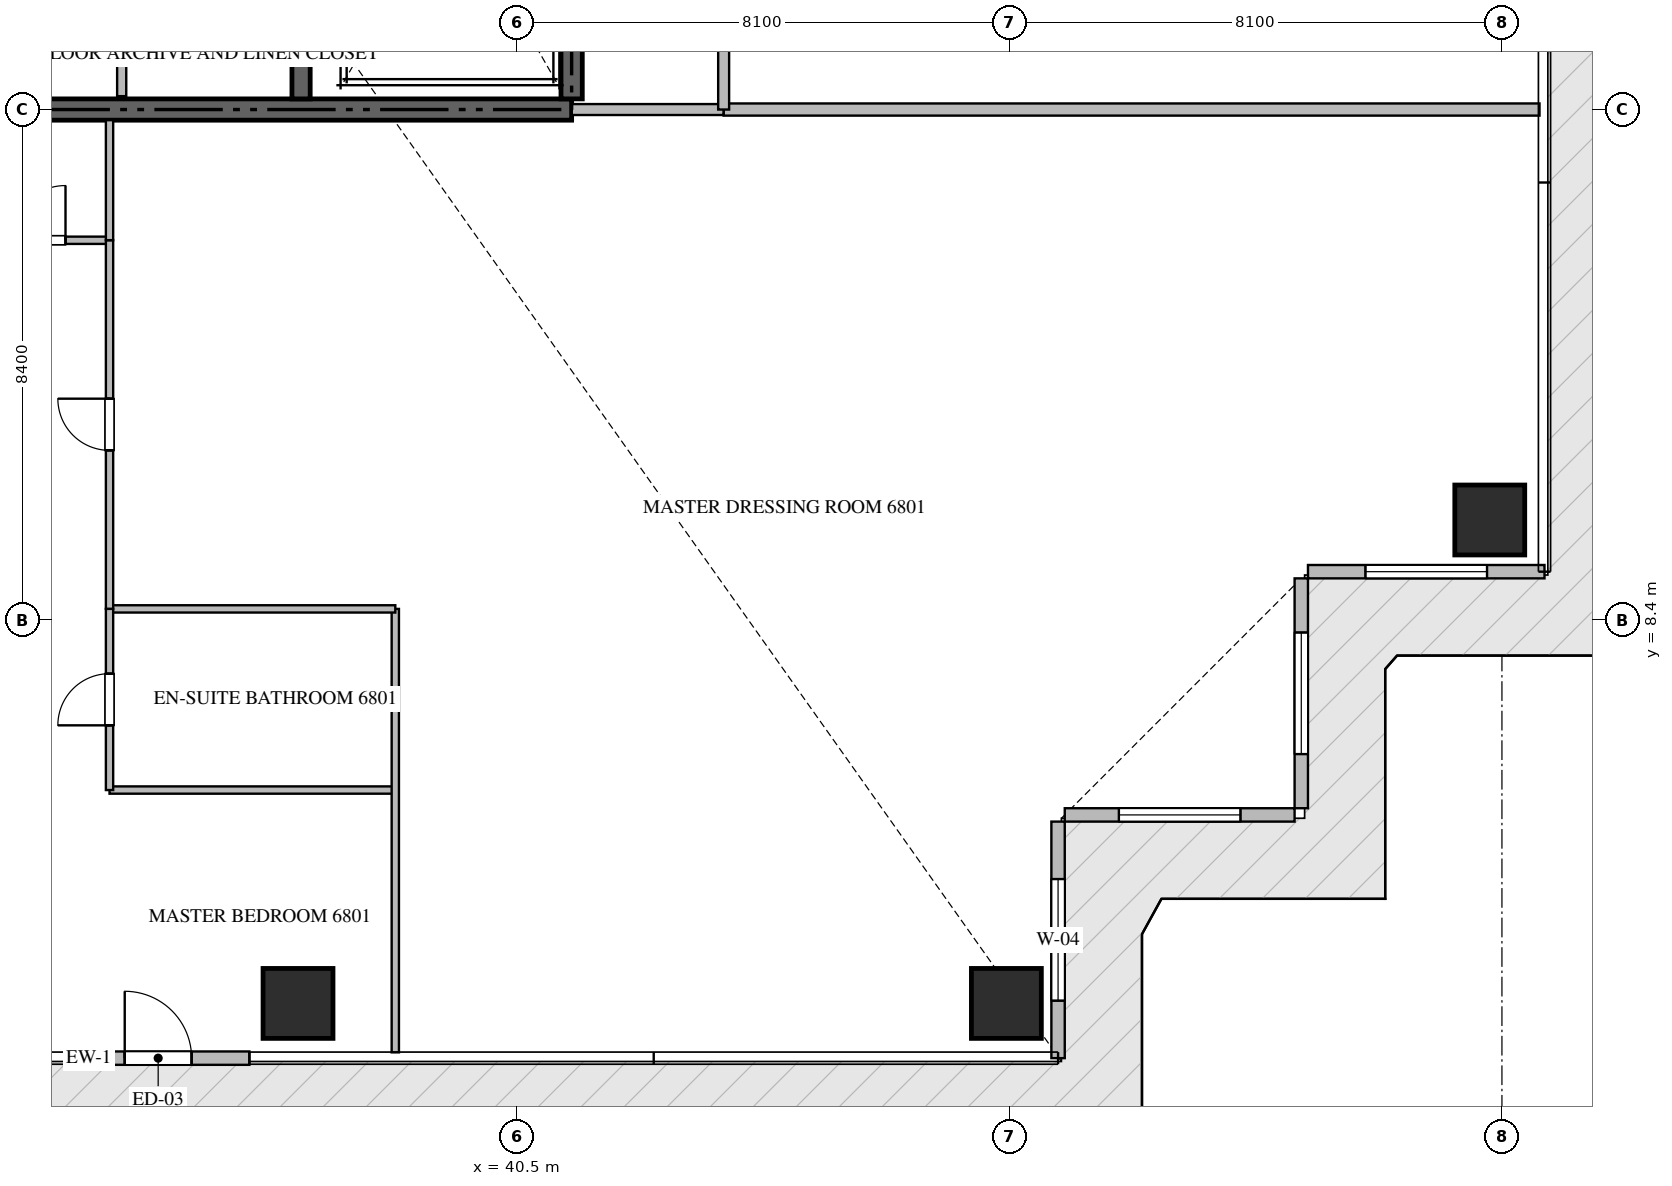
"""IFC4 building model, lengths in metres.
Left out: names, types, materials, properties, quantities, classifications, styles, units other than length and angle.
Written with IfcOpenShell. Run it as: python <this file> out.ifc"""

import sys

from ifc_helpers import new_model, si_unit, direction, frame, frame_2d, origin, origin_2d, place, context, subcontext, project, spatial, rectangle, extrude, source, transform, mapped, element, fill, save


model = new_model("IFC4")
c1 = context("Model", 3, precision=1e-05, world=origin(), true_north=direction((0.0, 1.0)))
c2 = subcontext(c1, "Body", "Model", "MODEL_VIEW")
j1 = project(units=[si_unit("LENGTHUNIT", "METRE"), si_unit("PLANEANGLEUNIT", "RADIAN")], contexts=[c1])
p1 = place(None, origin())
s1 = spatial("IfcSite", under=j1, at=p1, CompositionType="ELEMENT")
p2 = place(p1, origin())
s2 = spatial("IfcBuilding", under=s1, at=p2, CompositionType="ELEMENT")
p3 = place(p2, frame((0.0, 0.0, 272.05)))
s3 = spatial("IfcBuildingStorey", under=s2, at=p3, CompositionType="ELEMENT", Elevation=272.05)
p4 = place(p3, frame((23.4, 16.8, -0.26), z_axis=(0.0, 0.0, 1.0), x_axis=(1.0, 0.0, 0.0)))
e1 = element("IfcWall", 1, at=p4, inside=s3, PredefinedType="SHEAR", context=c2, shape_type="SweptSolid", body=[
    extrude(rectangle(XDim=18.0, YDim=0.35, at=frame_2d((9.0, 0.0))), origin(), (0.0, 0.0, 1.0), 3.848),
])
p5 = place(p3, frame((41.4, 16.975, -0.26), z_axis=(0.0, 0.0, 1.0), x_axis=(0.0, 1.0, 0.0)))
e2 = element("IfcWall", 2, at=p5, inside=s3, PredefinedType="SHEAR", context=c2, shape_type="SweptSolid", body=[
    extrude(rectangle(XDim=8.375, YDim=0.35, at=frame_2d((4.188, 0.0))), origin(), (0.0, 0.0, 1.0), 3.848),
])
p6 = place(p3, frame((36.95, 16.975, -0.26), z_axis=(0.0, 0.0, 1.0), x_axis=(0.0, 1.0, 0.0)))
e3 = element("IfcWall", 3, at=p6, inside=s3, PredefinedType="SHEAR", context=c2, shape_type="SweptSolid", body=[
    extrude(rectangle(XDim=8.375, YDim=0.3, at=frame_2d((4.188, 0.0))), origin(), (0.0, 0.0, 1.0), 3.848),
])
m1 = source(origin(), c2, "Body", "SweptSolid", [
    extrude(rectangle(XDim=1.15, YDim=1.15, at=origin_2d()), origin(), (0.0, 0.0, 1.0), 3.85),
])
for number, where, z_axis, x_axis in (
    (4, (36.9, 2.1, -0.26), (0.0, 0.0, 1.0), (1.0, 0.0, 0.0)),
    (5, (48.55, 2.1, -0.26), (0.0, 0.0, 1.0), (1.0, 0.0, 0.0)),
    (6, (56.5, 10.05, -0.26), (0.0, 0.0, 1.0), (1.0, 0.0, 0.0)),
):
    element("IfcColumn", number, at=place(p3, frame(where, z_axis=z_axis, x_axis=x_axis)), inside=s3, PredefinedType="COLUMN", context=c2, shape_type="MappedRepresentation", body=[
        mapped(m1, transform((0.0, 0.0, 0.0), scale=1.0)),
    ])
p7 = place(p3, frame((33.1, 1.2, 0.0), z_axis=(0.0, 0.0, 1.0), x_axis=(1.0, 0.0, 0.0)))
e7 = element("IfcWall", 7, at=p7, inside=s3, PredefinedType="ELEMENTEDWALL", context=c2, shape_type="SweptSolid", body=[
    extrude(rectangle(XDim=3.0, YDim=0.22, at=frame_2d((1.5, 0.0))), origin(), (0.0, 0.0, 1.0), 3.575),
])
p8 = place(p7, frame((0.95, 0.0, 0.0)))
e8 = element("IfcOpeningElement", 8, at=p8, cuts=e7, PredefinedType="OPENING", context=c2, shape_type="SweptSolid", body=[
    extrude(rectangle(XDim=1.1, YDim=2.2, at=frame_2d((0.55, 1.1))), frame((0.0, 0.12, 0.0), z_axis=(0.0, -1.0, 0.0), x_axis=(1.0, 0.0, 0.0)), (0.0, 0.0, 1.0), 0.24),
])
p9 = place(p3, frame((49.4, 1.2, 0.0), z_axis=(0.0, 0.0, 1.0), x_axis=(0.0, 1.0, 0.0)))
e9 = element("IfcWall", 9, at=p9, inside=s3, PredefinedType="ELEMENTEDWALL", context=c2, shape_type="SweptSolid", body=[
    extrude(rectangle(XDim=3.89, YDim=0.22, at=frame_2d((1.945, 0.0))), origin(), (0.0, 0.0, 1.0), 3.575),
])
p10 = place(p9, frame((0.945, 0.0, 0.65)))
e10 = element("IfcOpeningElement", 10, at=p10, cuts=e9, PredefinedType="OPENING", context=c2, shape_type="SweptSolid", body=[
    extrude(rectangle(XDim=2.0, YDim=2.2, at=frame_2d((1.0, 1.1))), frame((0.0, 0.12, 0.0), z_axis=(0.0, -1.0, 0.0), x_axis=(1.0, 0.0, 0.0)), (0.0, 0.0, 1.0), 0.24),
])
p11 = place(p3, frame((49.51, 5.2, 0.0), z_axis=(0.0, 0.0, 1.0), x_axis=(1.0, 0.0, 0.0)))
e11 = element("IfcWall", 11, at=p11, inside=s3, PredefinedType="ELEMENTEDWALL", context=c2, shape_type="SweptSolid", body=[
    extrude(rectangle(XDim=3.78, YDim=0.22, at=frame_2d((1.89, 0.0))), origin(), (0.0, 0.0, 1.0), 3.575),
])
p12 = place(p11, frame((0.89, 0.0, 0.65)))
e12 = element("IfcOpeningElement", 12, at=p12, cuts=e11, PredefinedType="OPENING", context=c2, shape_type="SweptSolid", body=[
    extrude(rectangle(XDim=2.0, YDim=2.2, at=frame_2d((1.0, 1.1))), frame((0.0, 0.12, 0.0), z_axis=(0.0, -1.0, 0.0), x_axis=(1.0, 0.0, 0.0)), (0.0, 0.0, 1.0), 0.24),
])
p13 = place(p3, frame((53.4, 5.31, 0.0), z_axis=(0.0, 0.0, 1.0), x_axis=(0.0, 1.0, 0.0)))
e13 = element("IfcWall", 13, at=p13, inside=s3, PredefinedType="ELEMENTEDWALL", context=c2, shape_type="SweptSolid", body=[
    extrude(rectangle(XDim=3.78, YDim=0.22, at=frame_2d((1.89, 0.0))), origin(), (0.0, 0.0, 1.0), 3.575),
])
p14 = place(p13, frame((0.89, 0.0, 0.65)))
e14 = element("IfcOpeningElement", 14, at=p14, cuts=e13, PredefinedType="OPENING", context=c2, shape_type="SweptSolid", body=[
    extrude(rectangle(XDim=2.0, YDim=2.2, at=frame_2d((1.0, 1.1))), frame((0.0, 0.12, 0.0), z_axis=(0.0, -1.0, 0.0), x_axis=(1.0, 0.0, 0.0)), (0.0, 0.0, 1.0), 0.24),
])
p15 = place(p3, frame((53.51, 9.2, 0.0), z_axis=(0.0, 0.0, 1.0), x_axis=(1.0, 0.0, 0.0)))
e15 = element("IfcWall", 15, at=p15, inside=s3, PredefinedType="ELEMENTEDWALL", context=c2, shape_type="SweptSolid", body=[
    extrude(rectangle(XDim=3.89, YDim=0.22, at=frame_2d((1.945, 0.0))), origin(), (0.0, 0.0, 1.0), 3.575),
])
p16 = place(p15, frame((0.945, 0.0, 0.65)))
e16 = element("IfcOpeningElement", 16, at=p16, cuts=e15, PredefinedType="OPENING", context=c2, shape_type="SweptSolid", body=[
    extrude(rectangle(XDim=2.0, YDim=2.2, at=frame_2d((1.0, 1.1))), frame((0.0, 0.12, 0.0), z_axis=(0.0, -1.0, 0.0), x_axis=(1.0, 0.0, 0.0)), (0.0, 0.0, 1.0), 0.24),
])
p17 = place(p3, frame((34.0, 17.02, 0.0), z_axis=(0.0, 0.0, 1.0), x_axis=(0.0, 1.0, 0.0)))
e17 = element("IfcWall", 17, at=p17, inside=s3, PredefinedType="PARTITIONING", context=c2, shape_type="SweptSolid", body=[
    extrude(rectangle(XDim=2.73, YDim=0.15, at=frame_2d((1.365, 0.0))), origin(), (0.0, 0.0, 1.0), 3.59),
])
p18 = place(p3, frame((43.9, 16.8, 0.0), z_axis=(0.0, 0.0, 1.0), x_axis=(1.0, 0.0, 0.0)))
e18 = element("IfcWall", 18, at=p18, inside=s3, PredefinedType="PARTITIONING", context=c2, shape_type="SweptSolid", body=[
    extrude(rectangle(XDim=13.418, YDim=0.2, at=frame_2d((6.709, 0.0))), origin(), (0.0, 0.0, 1.0), 3.59),
])
p19 = place(p3, frame((41.402, 16.8, 0.0), z_axis=(0.0, 0.0, 1.0), x_axis=(1.0, 0.0, 0.0)))
e19 = element("IfcWall", 19, at=p19, inside=s3, PredefinedType="PARTITIONING", context=c2, shape_type="SweptSolid", body=[
    extrude(rectangle(XDim=2.496, YDim=0.18, at=frame_2d((1.248, 0.0))), origin(), (0.0, 0.0, 1.0), 3.59),
])
p20 = place(p3, frame((43.9, 16.8, 0.0), z_axis=(0.0, 0.0, 1.0), x_axis=(0.0, 1.0, 0.0)))
e20 = element("IfcWall", 20, at=p20, inside=s3, PredefinedType="PARTITIONING", context=c2, shape_type="SweptSolid", body=[
    extrude(rectangle(XDim=16.8, YDim=0.18, at=frame_2d((8.4, 0.0))), origin(), (0.0, 0.0, 1.0), 3.59),
])
p21 = place(p20, frame((2.575, 0.0, 0.0)))
e21 = element("IfcOpeningElement", 21, at=p21, cuts=e20, PredefinedType="OPENING", context=c2, shape_type="SweptSolid", body=[
    extrude(rectangle(XDim=1.0, YDim=2.15, at=frame_2d((0.5, 1.075))), frame((0.0, 0.1, 0.0), z_axis=(0.0, -1.0, 0.0), x_axis=(1.0, 0.0, 0.0)), (0.0, 0.0, 1.0), 0.2),
])
p22 = place(p20, frame((10.997, 0.0, 0.0)))
e22 = element("IfcOpeningElement", 22, at=p22, cuts=e20, PredefinedType="OPENING", context=c2, shape_type="SweptSolid", body=[
    extrude(rectangle(XDim=1.0, YDim=2.15, at=frame_2d((0.5, 1.075))), frame((0.0, 0.1, 0.0), z_axis=(0.0, -1.0, 0.0), x_axis=(1.0, 0.0, 0.0)), (0.0, 0.0, 1.0), 0.2),
])
p23 = place(p3, frame((31.452, 14.65, 0.0), z_axis=(0.0, 0.0, 1.0), x_axis=(1.0, 0.0, 0.0)))
e23 = element("IfcWall", 23, at=p23, inside=s3, PredefinedType="PARTITIONING", context=c2, shape_type="SweptSolid", body=[
    extrude(rectangle(XDim=2.348, YDim=0.12, at=frame_2d((1.174, 0.0))), origin(), (0.0, 0.0, 1.0), 3.59),
])
p24 = place(p23, frame((0.724, 0.0, 0.0)))
e24 = element("IfcOpeningElement", 24, at=p24, cuts=e23, PredefinedType="OPENING", context=c2, shape_type="SweptSolid", body=[
    extrude(rectangle(XDim=0.9, YDim=2.1, at=frame_2d((0.45, 1.05))), frame((0.0, 0.07, 0.0), z_axis=(0.0, -1.0, 0.0), x_axis=(1.0, 0.0, 0.0)), (0.0, 0.0, 1.0), 0.14),
])
p25 = place(p3, frame((33.8, 5.609, 0.0), z_axis=(0.0, 0.0, 1.0), x_axis=(1.0, 0.0, 0.0)))
e25 = element("IfcWall", 25, at=p25, inside=s3, PredefinedType="PARTITIONING", context=c2, shape_type="SweptSolid", body=[
    extrude(rectangle(XDim=4.7, YDim=0.12, at=frame_2d((2.35, 0.0))), origin(), (0.0, 0.0, 1.0), 3.59),
])
p26 = place(p3, frame((38.5, 1.295, 0.0), z_axis=(0.0, 0.0, 1.0), x_axis=(0.0, 1.0, 0.0)))
e26 = element("IfcWall", 26, at=p26, inside=s3, PredefinedType="PARTITIONING", context=c2, shape_type="SweptSolid", body=[
    extrude(rectangle(XDim=7.293, YDim=0.12, at=frame_2d((3.646, 0.0))), origin(), (0.0, 0.0, 1.0), 3.59),
])
p27 = place(p3, frame((33.8, 8.588, 0.0), z_axis=(0.0, 0.0, 1.0), x_axis=(1.0, 0.0, 0.0)))
e27 = element("IfcWall", 27, at=p27, inside=s3, PredefinedType="PARTITIONING", context=c2, shape_type="SweptSolid", body=[
    extrude(rectangle(XDim=4.7, YDim=0.12, at=frame_2d((2.35, 0.0))), origin(), (0.0, 0.0, 1.0), 3.59),
])
p28 = place(p3, frame((33.8, 5.609, 0.0), z_axis=(0.0, 0.0, 1.0), x_axis=(0.0, 1.0, 0.0)))
e28 = element("IfcWall", 28, at=p28, inside=s3, PredefinedType="PARTITIONING", context=c2, shape_type="SweptSolid", body=[
    extrude(rectangle(XDim=2.979, YDim=0.12, at=frame_2d((1.49, 0.0))), origin(), (0.0, 0.0, 1.0), 3.59),
])
p29 = place(p28, frame((1.064, 0.0, 0.0)))
e29 = element("IfcOpeningElement", 29, at=p29, cuts=e28, PredefinedType="OPENING", context=c2, shape_type="SweptSolid", body=[
    extrude(rectangle(XDim=0.85, YDim=2.1, at=frame_2d((0.425, 1.05))), frame((0.0, 0.07, 0.0), z_axis=(0.0, -1.0, 0.0), x_axis=(1.0, 0.0, 0.0)), (0.0, 0.0, 1.0), 0.14),
])
p30 = place(p3, frame((33.8, 8.59, 0.0), z_axis=(0.0, 0.0, 1.0), x_axis=(0.0, 1.0, 0.0)))
e30 = element("IfcWall", 30, at=p30, inside=s3, PredefinedType="PARTITIONING", context=c2, shape_type="SweptSolid", body=[
    extrude(rectangle(XDim=6.06, YDim=0.12, at=frame_2d((3.03, 0.0))), origin(), (0.0, 0.0, 1.0), 3.59),
])
p31 = place(p30, frame((2.605, 0.0, 0.0)))
e31 = element("IfcOpeningElement", 31, at=p31, cuts=e30, PredefinedType="OPENING", context=c2, shape_type="SweptSolid", body=[
    extrude(rectangle(XDim=0.85, YDim=2.1, at=frame_2d((0.425, 1.05))), frame((0.0, 0.07, 0.0), z_axis=(0.0, -1.0, 0.0), x_axis=(1.0, 0.0, 0.0)), (0.0, 0.0, 1.0), 0.14),
])
p32 = place(p3, frame((33.8, 14.652, 0.0), z_axis=(0.0, 0.0, 1.0), x_axis=(0.0, 1.0, 0.0)))
e32 = element("IfcWall", 32, at=p32, inside=s3, PredefinedType="PARTITIONING", context=c2, shape_type="SweptSolid", body=[
    extrude(rectangle(XDim=1.973, YDim=0.12, at=frame_2d((0.986, 0.0))), origin(), (0.0, 0.0, 1.0), 3.59),
])
m2 = source(origin(), c2, "Body", "SweptSolid", [
    extrude(rectangle(XDim=1.1, YDim=2.2, at=frame_2d((0.55, 1.1))), frame((0.0, 0.025, 0.0), z_axis=(0.0, -1.0, 0.0), x_axis=(1.0, 0.0, 0.0)), (0.0, 0.0, 1.0), 0.05),
])
p33 = place(p8, origin())
e33 = element("IfcDoor", 33, at=p33, inside=s3, OperationType="SINGLE_SWING_LEFT", PredefinedType="DOOR", context=c2, shape_type="MappedRepresentation", body=[
    mapped(m2, transform((0.0, 0.0, 0.0), scale=1.0)),
])
fill(e8, e33)
m3 = source(origin(), c2, "Body", "SweptSolid", [
    extrude(rectangle(XDim=2.0, YDim=2.2, at=frame_2d((1.0, 1.1))), frame((0.0, 0.03, 0.0), z_axis=(0.0, -1.0, 0.0), x_axis=(1.0, 0.0, 0.0)), (0.0, 0.0, 1.0), 0.06),
])
p34 = place(p10, origin())
e34 = element("IfcWindow", 34, at=p34, inside=s3, PartitioningType="SINGLE_PANEL", PredefinedType="WINDOW", context=c2, shape_type="MappedRepresentation", body=[
    mapped(m3, transform((0.0, 0.0, 0.0), scale=1.0)),
])
fill(e10, e34)
p35 = place(p12, origin())
e35 = element("IfcWindow", 35, at=p35, inside=s3, PartitioningType="SINGLE_PANEL", PredefinedType="WINDOW", context=c2, shape_type="MappedRepresentation", body=[
    mapped(m3, transform((0.0, 0.0, 0.0), scale=1.0)),
])
fill(e12, e35)
p36 = place(p14, origin())
e36 = element("IfcWindow", 36, at=p36, inside=s3, PartitioningType="SINGLE_PANEL", PredefinedType="WINDOW", context=c2, shape_type="MappedRepresentation", body=[
    mapped(m3, transform((0.0, 0.0, 0.0), scale=1.0)),
])
fill(e14, e36)
p37 = place(p16, origin())
e37 = element("IfcWindow", 37, at=p37, inside=s3, PartitioningType="SINGLE_PANEL", PredefinedType="WINDOW", context=c2, shape_type="MappedRepresentation", body=[
    mapped(m3, transform((0.0, 0.0, 0.0), scale=1.0)),
])
fill(e16, e37)
m4 = source(origin(), c2, "Body", "SweptSolid", [
    extrude(rectangle(XDim=0.9, YDim=2.1, at=frame_2d((0.45, 1.05))), frame((0.0, 0.025, 0.0), z_axis=(0.0, -1.0, 0.0), x_axis=(1.0, 0.0, 0.0)), (0.0, 0.0, 1.0), 0.05),
])
p38 = place(p24, origin())
e38 = element("IfcDoor", 38, at=p38, inside=s3, OperationType="SINGLE_SWING_RIGHT", PredefinedType="DOOR", context=c2, shape_type="MappedRepresentation", body=[
    mapped(m4, transform((0.0, 0.0, 0.0), scale=1.0)),
])
fill(e24, e38)
m5 = source(origin(), c2, "Body", "SweptSolid", [
    extrude(rectangle(XDim=0.85, YDim=2.1, at=frame_2d((0.425, 1.05))), frame((0.0, 0.025, 0.0), z_axis=(0.0, -1.0, 0.0), x_axis=(1.0, 0.0, 0.0)), (0.0, 0.0, 1.0), 0.05),
])
p39 = place(p29, origin())
e39 = element("IfcDoor", 39, at=p39, inside=s3, OperationType="SINGLE_SWING_LEFT", PredefinedType="DOOR", context=c2, shape_type="MappedRepresentation", body=[
    mapped(m5, transform((0.0, 0.0, 0.0), scale=1.0)),
])
fill(e29, e39)
p40 = place(p31, origin())
e40 = element("IfcDoor", 40, at=p40, inside=s3, OperationType="SINGLE_SWING_RIGHT", PredefinedType="DOOR", context=c2, shape_type="MappedRepresentation", body=[
    mapped(m5, transform((0.0, 0.0, 0.0), scale=1.0)),
])
fill(e31, e40)
save(model, sys.argv[1])
